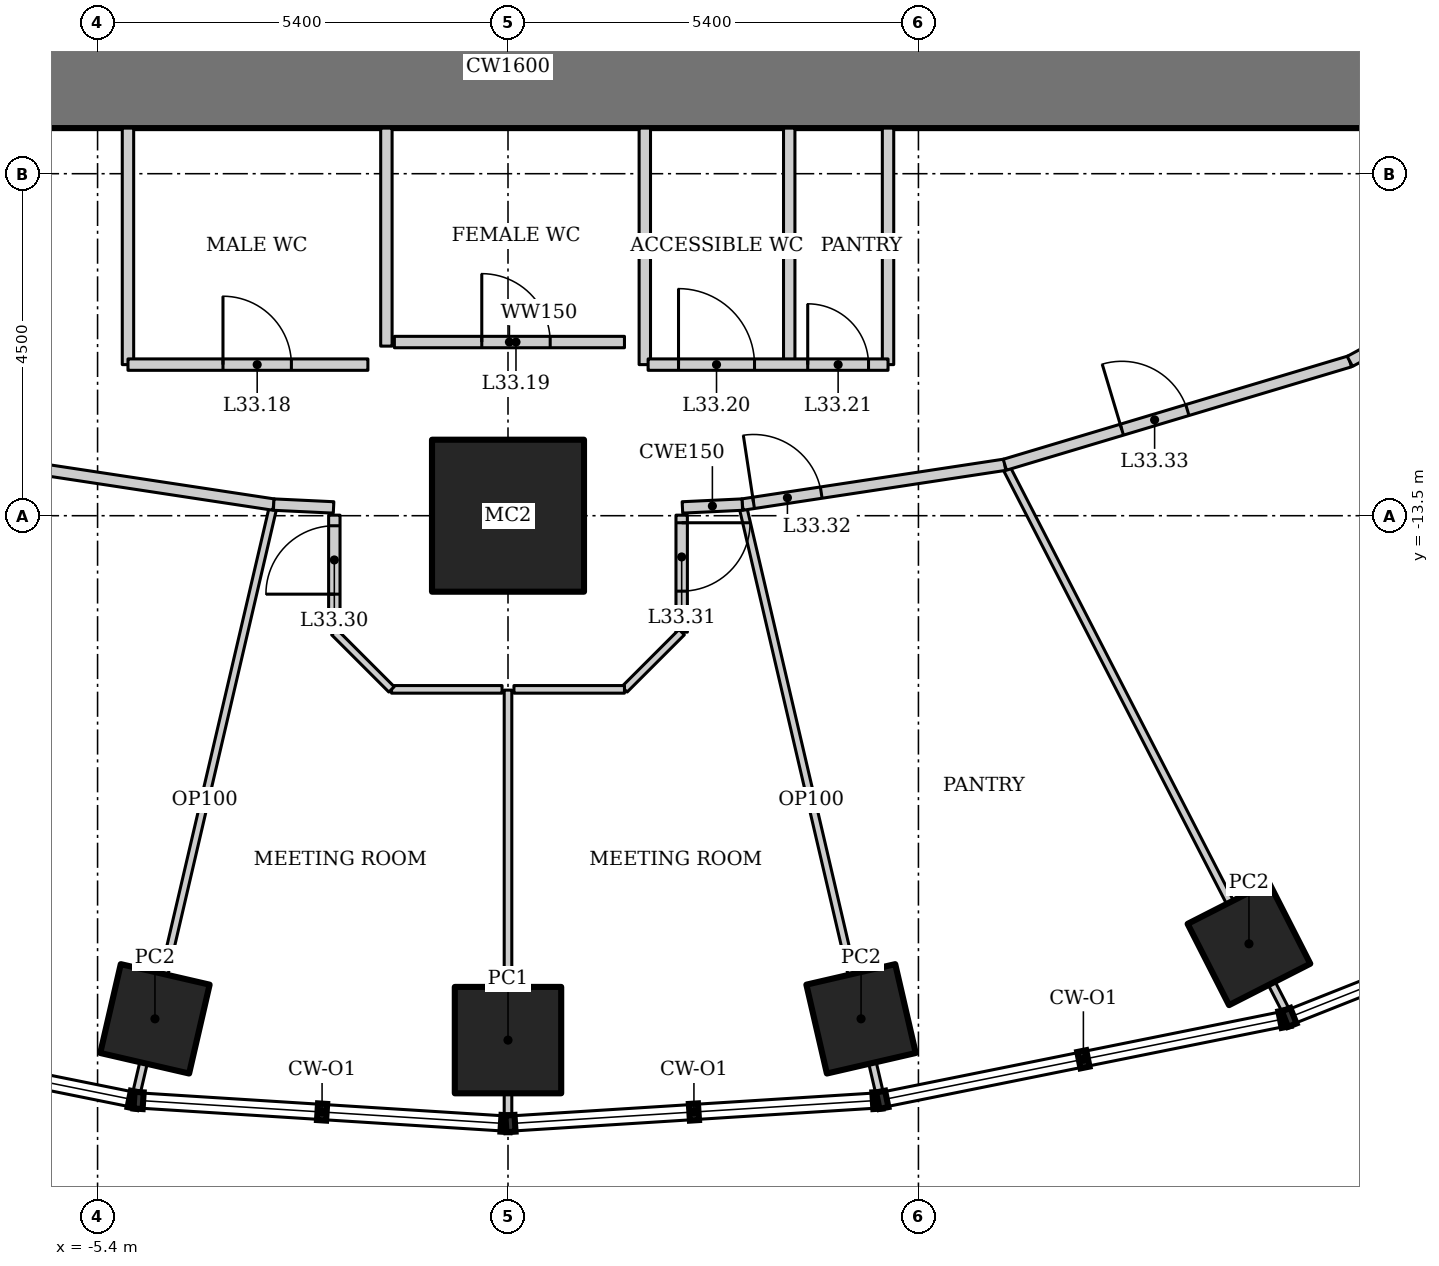
"""IFC4 building model, lengths in metres.
Left out: names, types, materials, properties, quantities, classifications, styles, units other than length and angle.
Written with IfcOpenShell. Run it as: python <this file> out.ifc"""

import sys

from ifc_helpers import new_model, si_unit, direction, frame, frame_2d, origin, origin_2d, place, context, subcontext, project, spatial, rectangle, hollow_rectangle, extrude, element, fill, save


model = new_model("IFC4")
c1 = context("Model", 3, precision=1e-05, world=origin(), true_north=direction((0.0, 1.0)))
c2 = subcontext(c1, "Body", "Model", "MODEL_VIEW")
j1 = project(units=[si_unit("LENGTHUNIT", "METRE"), si_unit("PLANEANGLEUNIT", "RADIAN")], contexts=[c1])
p1 = place(None, origin())
s1 = spatial("IfcSite", under=j1, at=p1, CompositionType="ELEMENT")
p2 = place(p1, origin())
s2 = spatial("IfcBuilding", under=s1, at=p2, CompositionType="ELEMENT")
p3 = place(p2, frame((0.0, 0.0, 142.6)))
s3 = spatial("IfcBuildingStorey", under=s2, at=p3, CompositionType="ELEMENT", Elevation=142.6)
p4 = place(p3, frame((0.0, -13.5, 0.0), z_axis=(0.0, 0.0, 1.0), x_axis=(1.0, 0.0, 0.0)))
e1 = element("IfcColumn", 1, at=p4, inside=s3, PredefinedType="COLUMN", context=c2, shape_type="SweptSolid", body=[
    extrude(hollow_rectangle(XDim=2.0, YDim=2.0, WallThickness=0.17, at=origin_2d()), origin(), (0.0, 0.0, 1.0), 4.2),
])
p5 = place(p3, frame((-4.645, -20.12, 0.0), z_axis=(0.0, 0.0, 1.0), x_axis=(0.224951054344, 0.974370064785, 0.0)))
e2 = element("IfcColumn", 2, at=p5, inside=s3, PredefinedType="COLUMN", context=c2, shape_type="SweptSolid", body=[
    extrude(hollow_rectangle(XDim=1.2, YDim=1.2, WallThickness=0.1, at=origin_2d()), origin(), (0.0, 0.0, 1.0), 4.2),
])
p6 = place(p3, frame((0.0, -20.4, 0.0), z_axis=(0.0, 0.0, 1.0), x_axis=(1.0, 0.0, 0.0)))
e3 = element("IfcColumn", 3, at=p6, inside=s3, PredefinedType="COLUMN", context=c2, shape_type="SweptSolid", body=[
    extrude(hollow_rectangle(XDim=1.4, YDim=1.4, WallThickness=0.1, at=origin_2d()), origin(), (0.0, 0.0, 1.0), 4.2),
])
for number, where, z_axis, x_axis in (
    (4, (4.645, -20.12, 0.0), (0.0, 0.0, 1.0), (0.974, 0.225, 0.0)),
    (5, (9.749, -19.133, 0.0), (0.0, 0.0, 1.0), (0.891, 0.454, 0.0)),
):
    element("IfcColumn", number, at=place(p3, frame(where, z_axis=z_axis, x_axis=x_axis)), inside=s3, PredefinedType="COLUMN", context=c2, shape_type="SweptSolid", body=[
        extrude(hollow_rectangle(XDim=1.2, YDim=1.2, WallThickness=0.1, at=origin_2d()), origin(), (0.0, 0.0, 1.0), 4.2),
    ])
p7 = place(p3, frame((-12.2, -7.6, 0.0), z_axis=(0.0, 0.0, 1.0), x_axis=(1.0, 0.0, 0.0)))
e6 = element("IfcWall", 6, at=p7, inside=s3, PredefinedType="SHEAR", context=c2, shape_type="SweptSolid", body=[
    extrude(rectangle(XDim=24.4, YDim=1.6, at=frame_2d((12.2, 0.0))), origin(), (0.0, 0.0, 1.0), 4.2),
])
for number, where, z_axis, x_axis in (
    (7, (-4.897, -21.135, 0.0), (0.0, 0.0, 1.0), (0.227, 0.974, 0.0)),
    (8, (4.897, -21.135, 0.0), (0.0, 0.0, 1.0), (-0.227, 0.974, 0.0)),
):
    element("IfcWall", number, at=place(p3, frame(where, z_axis=z_axis, x_axis=x_axis)), inside=s3, PredefinedType="PARTITIONING", context=c2, shape_type="SweptSolid", body=[
        extrude(rectangle(XDim=7.99, YDim=0.1, at=frame_2d((3.995, 0.0))), origin(), (0.0, 0.0, 1.0), 3.293),
    ])
p8 = place(p3, frame((10.253, -20.052, 0.0), z_axis=(0.0, 0.0, 1.0), x_axis=(-0.457535449567, 0.889191381194, 0.0)))
e9 = element("IfcWall", 9, at=p8, inside=s3, PredefinedType="PARTITIONING", context=c2, shape_type="SweptSolid", body=[
    extrude(rectangle(XDim=8.123, YDim=0.1, at=frame_2d((4.061, 0.0))), origin(), (0.0, 0.0, 1.0), 3.349),
])
p9 = place(p3, frame((-6.537, -12.829, 0.0), z_axis=(0.0, 0.0, 1.0), x_axis=(0.988668719464, -0.150113833987, 0.0)))
e10 = element("IfcWall", 10, at=p9, inside=s3, PredefinedType="PARTITIONING", context=c2, shape_type="SweptSolid", body=[
    extrude(rectangle(XDim=3.493, YDim=0.15, at=frame_2d((1.747, 0.0))), origin(), (0.0, 0.0, 1.0), 4.05),
])
p10 = place(p3, frame((3.083, -13.354, 0.0), z_axis=(0.0, 0.0, 1.0), x_axis=(0.988668719464, 0.150113833987, 0.0)))
e11 = element("IfcWall", 11, at=p10, inside=s3, PredefinedType="PARTITIONING", context=c2, shape_type="SweptSolid", body=[
    extrude(rectangle(XDim=3.493, YDim=0.15, at=frame_2d((1.747, 0.0))), origin(), (0.0, 0.0, 1.0), 4.05),
])
p11 = place(p10, frame((0.15, 0.0, 0.0)))
e12 = element("IfcOpeningElement", 12, at=p11, cuts=e11, PredefinedType="OPENING", context=c2, shape_type="SweptSolid", body=[
    extrude(rectangle(XDim=0.9, YDim=2.1, at=frame_2d((0.45, 1.05))), frame((0.0, 0.085, 0.0), z_axis=(0.0, -1.0, 0.0), x_axis=(1.0, 0.0, 0.0)), (0.0, 0.0, 1.0), 0.17),
])
p12 = place(p3, frame((6.537, -12.829, 0.0), z_axis=(0.0, 0.0, 1.0), x_axis=(0.957933992798, 0.286988615527, 0.0)))
e13 = element("IfcWall", 13, at=p12, inside=s3, PredefinedType="PARTITIONING", context=c2, shape_type="SweptSolid", body=[
    extrude(rectangle(XDim=4.738, YDim=0.15, at=frame_2d((2.369, 0.0))), origin(), (0.0, 0.0, 1.0), 4.05),
])
p13 = place(p12, frame((1.607, 0.0, 0.0)))
e14 = element("IfcOpeningElement", 14, at=p13, cuts=e13, PredefinedType="OPENING", context=c2, shape_type="SweptSolid", body=[
    extrude(rectangle(XDim=0.9, YDim=2.1, at=frame_2d((0.45, 1.05))), frame((0.0, 0.085, 0.0), z_axis=(0.0, -1.0, 0.0), x_axis=(1.0, 0.0, 0.0)), (0.0, 0.0, 1.0), 0.17),
])
p14 = place(p3, frame((11.076, -11.469, 0.0), z_axis=(0.0, 0.0, 1.0), x_axis=(0.879436285334, 0.476016617397, 0.0)))
e15 = element("IfcWall", 15, at=p14, inside=s3, PredefinedType="PARTITIONING", context=c2, shape_type="SweptSolid", body=[
    extrude(rectangle(XDim=5.253, YDim=0.15, at=frame_2d((2.626, 0.0))), origin(), (0.0, 0.0, 1.0), 4.05),
])
for number, where, z_axis, x_axis in (
    (16, (-5.0, -8.4, 0.0), (0.0, 0.0, 1.0), (0.0, -1.0, 0.0)),
    (17, (5.0, -8.4, 0.0), (0.0, 0.0, 1.0), (0.0, -1.0, 0.0)),
    (18, (1.8, -8.4, 0.0), (0.0, 0.0, 1.0), (0.0, -1.0, 0.0)),
    (19, (3.7, -8.4, 0.0), (0.0, 0.0, 1.0), (0.0, -1.0, 0.0)),
):
    element("IfcWall", number, at=place(p3, frame(where, z_axis=z_axis, x_axis=x_axis)), inside=s3, PredefinedType="SOLIDWALL", context=c2, shape_type="SweptSolid", body=[
        extrude(rectangle(XDim=3.112, YDim=0.15, at=frame_2d((1.556, 0.0))), origin(), (0.0, 0.0, 1.0), 4.05),
    ])
p15 = place(p3, frame((0.0, -21.445, 0.0), z_axis=(0.0, 0.0, 1.0), x_axis=(0.0, 1.0, 0.0)))
e20 = element("IfcWall", 20, at=p15, inside=s3, PredefinedType="PARTITIONING", context=c2, shape_type="SweptSolid", body=[
    extrude(rectangle(XDim=5.65, YDim=0.1, at=frame_2d((2.825, 0.0))), origin(), (0.0, 0.0, 1.0), 3.646),
])
for number, where, z_axis, x_axis in (
    (21, (-3.083, -13.354, 0.0), (0.0, 0.0, 1.0), (0.999, -0.047, 0.0)),
    (22, (2.295, -13.391, 0.0), (0.0, 0.0, 1.0), (0.999, 0.047, 0.0)),
):
    element("IfcWall", number, at=place(p3, frame(where, z_axis=z_axis, x_axis=x_axis)), inside=s3, PredefinedType="PARTITIONING", context=c2, shape_type="SweptSolid", body=[
        extrude(rectangle(XDim=0.789, YDim=0.15, at=frame_2d((0.395, 0.0))), origin(), (0.0, 0.0, 1.0), 4.05),
    ])
p16 = place(p3, frame((-5.0, -11.512, 0.0), z_axis=(0.0, 0.0, 1.0), x_axis=(1.0, 0.0, 0.0)))
e23 = element("IfcWall", 23, at=p16, inside=s3, PredefinedType="SOLIDWALL", context=c2, shape_type="SweptSolid", body=[
    extrude(rectangle(XDim=3.156, YDim=0.15, at=frame_2d((1.578, 0.0))), origin(), (0.0, 0.0, 1.0), 4.05),
])
p17 = place(p16, frame((1.25, 0.0, 0.0)))
e24 = element("IfcOpeningElement", 24, at=p17, cuts=e23, PredefinedType="OPENING", context=c2, shape_type="SweptSolid", body=[
    extrude(rectangle(XDim=0.9, YDim=2.1, at=frame_2d((0.45, 1.05))), frame((0.0, 0.085, 0.0), z_axis=(0.0, -1.0, 0.0), x_axis=(1.0, 0.0, 0.0)), (0.0, 0.0, 1.0), 0.17),
])
p18 = place(p3, frame((1.844, -11.512, 0.0), z_axis=(0.0, 0.0, 1.0), x_axis=(1.0, 0.0, 0.0)))
e25 = element("IfcWall", 25, at=p18, inside=s3, PredefinedType="SOLIDWALL", context=c2, shape_type="SweptSolid", body=[
    extrude(rectangle(XDim=3.156, YDim=0.15, at=frame_2d((1.578, 0.0))), origin(), (0.0, 0.0, 1.0), 4.05),
])
p19 = place(p18, frame((0.4, 0.0, 0.0)))
e26 = element("IfcOpeningElement", 26, at=p19, cuts=e25, PredefinedType="OPENING", context=c2, shape_type="SweptSolid", body=[
    extrude(rectangle(XDim=1.0, YDim=2.1, at=frame_2d((0.5, 1.05))), frame((0.0, 0.085, 0.0), z_axis=(0.0, -1.0, 0.0), x_axis=(1.0, 0.0, 0.0)), (0.0, 0.0, 1.0), 0.17),
])
p20 = place(p18, frame((2.1, 0.0, 0.0)))
e27 = element("IfcOpeningElement", 27, at=p20, cuts=e25, PredefinedType="OPENING", context=c2, shape_type="SweptSolid", body=[
    extrude(rectangle(XDim=0.8, YDim=2.1, at=frame_2d((0.4, 1.05))), frame((0.0, 0.085, 0.0), z_axis=(0.0, -1.0, 0.0), x_axis=(1.0, 0.0, 0.0)), (0.0, 0.0, 1.0), 0.17),
])
p21 = place(p3, frame((-1.6, -8.4, 0.0), z_axis=(0.0, 0.0, 1.0), x_axis=(0.0, -1.0, 0.0)))
e28 = element("IfcWall", 28, at=p21, inside=s3, PredefinedType="SOLIDWALL", context=c2, shape_type="SweptSolid", body=[
    extrude(rectangle(XDim=2.869, YDim=0.15, at=frame_2d((1.434, 0.0))), origin(), (0.0, 0.0, 1.0), 4.05),
])
p22 = place(p3, frame((-1.495, -11.215, 0.0), z_axis=(0.0, 0.0, 1.0), x_axis=(1.0, 0.0, 0.0)))
e29 = element("IfcWall", 29, at=p22, inside=s3, PredefinedType="SOLIDWALL", context=c2, shape_type="SweptSolid", body=[
    extrude(rectangle(XDim=3.027, YDim=0.15, at=frame_2d((1.514, 0.0))), origin(), (0.0, 0.0, 1.0), 4.05),
])
p23 = place(p22, frame((1.15, 0.0, 0.0)))
e30 = element("IfcOpeningElement", 30, at=p23, cuts=e29, PredefinedType="OPENING", context=c2, shape_type="SweptSolid", body=[
    extrude(rectangle(XDim=0.9, YDim=2.1, at=frame_2d((0.45, 1.05))), frame((0.0, 0.085, 0.0), z_axis=(0.0, -1.0, 0.0), x_axis=(1.0, 0.0, 0.0)), (0.0, 0.0, 1.0), 0.17),
])
p24 = place(p3, frame((-2.285, -15.032, 0.0), z_axis=(0.0, 0.0, 1.0), x_axis=(0.0, 1.0, 0.0)))
e31 = element("IfcWall", 31, at=p24, inside=s3, PredefinedType="PARTITIONING", context=c2, shape_type="SweptSolid", body=[
    extrude(rectangle(XDim=1.54, YDim=0.15, at=frame_2d((0.77, 0.0))), origin(), (0.0, 0.0, 1.0), 4.05),
])
p25 = place(p24, frame((0.5, 0.0, 0.0)))
e32 = element("IfcOpeningElement", 32, at=p25, cuts=e31, PredefinedType="OPENING", context=c2, shape_type="SweptSolid", body=[
    extrude(rectangle(XDim=0.9, YDim=2.1, at=frame_2d((0.45, 1.05))), frame((0.0, 0.085, 0.0), z_axis=(0.0, -1.0, 0.0), x_axis=(1.0, 0.0, 0.0)), (0.0, 0.0, 1.0), 0.17),
])
p26 = place(p3, frame((-0.078, -15.785, 0.0), z_axis=(0.0, 0.0, 1.0), x_axis=(-1.0, 0.0, 0.0)))
e33 = element("IfcWall", 33, at=p26, inside=s3, PredefinedType="PARTITIONING", context=c2, shape_type="SweptSolid", body=[
    extrude(rectangle(XDim=1.454, YDim=0.1, at=frame_2d((0.727, 0.0))), origin(), (0.0, 0.0, 1.0), 4.05),
])
p27 = place(p3, frame((-1.532, -15.785, 0.0), z_axis=(0.0, 0.0, 1.0), x_axis=(-0.707106781187, 0.707106781187, 0.0)))
e34 = element("IfcWall", 34, at=p27, inside=s3, PredefinedType="PARTITIONING", context=c2, shape_type="SweptSolid", body=[
    extrude(rectangle(XDim=1.064, YDim=0.1, at=frame_2d((0.532, 0.0))), origin(), (0.0, 0.0, 1.0), 4.05),
])
p28 = place(p3, frame((2.285, -13.493, 0.0), z_axis=(0.0, 0.0, 1.0), x_axis=(0.0, -1.0, 0.0)))
e35 = element("IfcWall", 35, at=p28, inside=s3, PredefinedType="PARTITIONING", context=c2, shape_type="SweptSolid", body=[
    extrude(rectangle(XDim=1.54, YDim=0.15, at=frame_2d((0.77, 0.0))), origin(), (0.0, 0.0, 1.0), 4.05),
])
p29 = place(p28, frame((0.1, 0.0, 0.0)))
e36 = element("IfcOpeningElement", 36, at=p29, cuts=e35, PredefinedType="OPENING", context=c2, shape_type="SweptSolid", body=[
    extrude(rectangle(XDim=0.9, YDim=2.1, at=frame_2d((0.45, 1.05))), frame((0.0, 0.085, 0.0), z_axis=(0.0, -1.0, 0.0), x_axis=(1.0, 0.0, 0.0)), (0.0, 0.0, 1.0), 0.17),
])
p30 = place(p3, frame((2.285, -15.032, 0.0), z_axis=(0.0, 0.0, 1.0), x_axis=(-0.707106781187, -0.707106781187, 0.0)))
e37 = element("IfcWall", 37, at=p30, inside=s3, PredefinedType="PARTITIONING", context=c2, shape_type="SweptSolid", body=[
    extrude(rectangle(XDim=1.064, YDim=0.1, at=frame_2d((0.532, 0.0))), origin(), (0.0, 0.0, 1.0), 4.05),
])
p31 = place(p3, frame((1.532, -15.785, 0.0), z_axis=(0.0, 0.0, 1.0), x_axis=(-1.0, 0.0, 0.0)))
e38 = element("IfcWall", 38, at=p31, inside=s3, PredefinedType="PARTITIONING", context=c2, shape_type="SweptSolid", body=[
    extrude(rectangle(XDim=1.454, YDim=0.1, at=frame_2d((0.727, 0.0))), origin(), (0.0, 0.0, 1.0), 4.05),
])
p32 = place(p17, origin())
e39 = element("IfcDoor", 39, at=p32, inside=s3, OperationType="SINGLE_SWING_LEFT", PredefinedType="DOOR", context=c2, shape_type="SweptSolid", body=[
    extrude(rectangle(XDim=0.9, YDim=2.1, at=frame_2d((0.45, 1.05))), frame((0.0, 0.025, 0.0), z_axis=(0.0, -1.0, 0.0), x_axis=(1.0, 0.0, 0.0)), (0.0, 0.0, 1.0), 0.05),
])
fill(e24, e39)
p33 = place(p23, origin())
e40 = element("IfcDoor", 40, at=p33, inside=s3, OperationType="SINGLE_SWING_LEFT", PredefinedType="DOOR", context=c2, shape_type="SweptSolid", body=[
    extrude(rectangle(XDim=0.9, YDim=2.1, at=frame_2d((0.45, 1.05))), frame((0.0, 0.025, 0.0), z_axis=(0.0, -1.0, 0.0), x_axis=(1.0, 0.0, 0.0)), (0.0, 0.0, 1.0), 0.05),
])
fill(e30, e40)
p34 = place(p19, origin())
e41 = element("IfcDoor", 41, at=p34, inside=s3, OperationType="SINGLE_SWING_LEFT", PredefinedType="DOOR", context=c2, shape_type="SweptSolid", body=[
    extrude(rectangle(XDim=1.0, YDim=2.1, at=frame_2d((0.5, 1.05))), frame((0.0, 0.025, 0.0), z_axis=(0.0, -1.0, 0.0), x_axis=(1.0, 0.0, 0.0)), (0.0, 0.0, 1.0), 0.05),
])
fill(e26, e41)
p35 = place(p20, origin())
e42 = element("IfcDoor", 42, at=p35, inside=s3, OperationType="SINGLE_SWING_LEFT", PredefinedType="DOOR", context=c2, shape_type="SweptSolid", body=[
    extrude(rectangle(XDim=0.8, YDim=2.1, at=frame_2d((0.4, 1.05))), frame((0.0, 0.025, 0.0), z_axis=(0.0, -1.0, 0.0), x_axis=(1.0, 0.0, 0.0)), (0.0, 0.0, 1.0), 0.05),
])
fill(e27, e42)
p36 = place(p25, origin())
e43 = element("IfcDoor", 43, at=p36, inside=s3, OperationType="SINGLE_SWING_LEFT", PredefinedType="DOOR", context=c2, shape_type="SweptSolid", body=[
    extrude(rectangle(XDim=0.9, YDim=2.1, at=frame_2d((0.45, 1.05))), frame((0.0, 0.025, 0.0), z_axis=(0.0, -1.0, 0.0), x_axis=(1.0, 0.0, 0.0)), (0.0, 0.0, 1.0), 0.05),
])
fill(e32, e43)
p37 = place(p29, origin())
e44 = element("IfcDoor", 44, at=p37, inside=s3, OperationType="SINGLE_SWING_LEFT", PredefinedType="DOOR", context=c2, shape_type="SweptSolid", body=[
    extrude(rectangle(XDim=0.9, YDim=2.1, at=frame_2d((0.45, 1.05))), frame((0.0, 0.025, 0.0), z_axis=(0.0, -1.0, 0.0), x_axis=(1.0, 0.0, 0.0)), (0.0, 0.0, 1.0), 0.05),
])
fill(e36, e44)
p38 = place(p11, origin())
e45 = element("IfcDoor", 45, at=p38, inside=s3, OperationType="SINGLE_SWING_LEFT", PredefinedType="DOOR", context=c2, shape_type="SweptSolid", body=[
    extrude(rectangle(XDim=0.9, YDim=2.1, at=frame_2d((0.45, 1.05))), frame((0.0, 0.025, 0.0), z_axis=(0.0, -1.0, 0.0), x_axis=(1.0, 0.0, 0.0)), (0.0, 0.0, 1.0), 0.05),
])
fill(e12, e45)
p39 = place(p13, origin())
e46 = element("IfcDoor", 46, at=p39, inside=s3, OperationType="SINGLE_SWING_LEFT", PredefinedType="DOOR", context=c2, shape_type="SweptSolid", body=[
    extrude(rectangle(XDim=0.9, YDim=2.1, at=frame_2d((0.45, 1.05))), frame((0.0, 0.025, 0.0), z_axis=(0.0, -1.0, 0.0), x_axis=(1.0, 0.0, 0.0)), (0.0, 0.0, 1.0), 0.05),
])
fill(e14, e46)
save(model, sys.argv[1])
